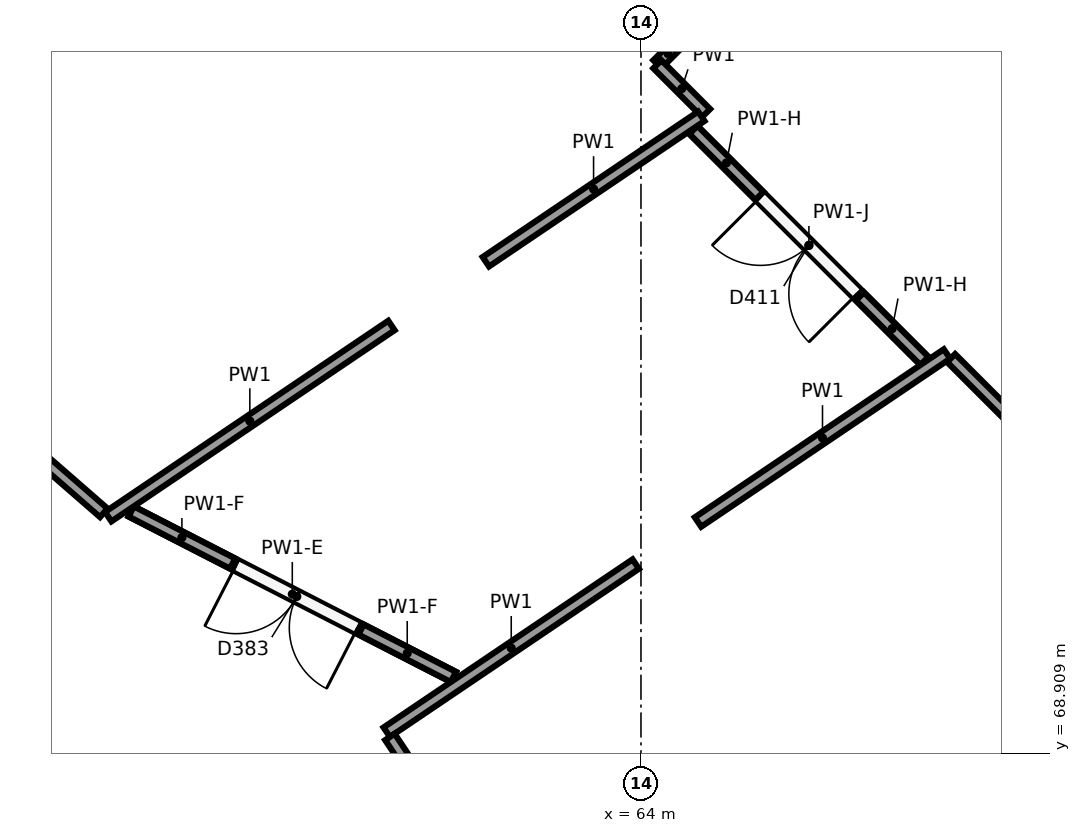
"""IFC4 building model, lengths in metres.
Left out: names, types, materials, properties, quantities, classifications, styles, units other than length and angle.
Written with IfcOpenShell. Run it as: python <this file> out.ifc"""

import sys

from ifc_helpers import new_model, si_unit, direction, frame, frame_2d, origin, origin_2d, place, context, subcontext, project, spatial, rectangle, circle, extrude, element, fill, save


model = new_model("IFC4")
c1 = context("Model", 3, precision=1e-05, world=origin(), true_north=direction((0.0, 1.0)))
c2 = subcontext(c1, "Body", "Model", "MODEL_VIEW")
j1 = project(units=[si_unit("LENGTHUNIT", "METRE"), si_unit("PLANEANGLEUNIT", "RADIAN")], contexts=[c1])
p1 = place(None, origin())
s1 = spatial("IfcSite", under=j1, at=p1, CompositionType="ELEMENT")
p2 = place(p1, origin())
s2 = spatial("IfcBuilding", under=s1, at=p2, CompositionType="ELEMENT")
p3 = place(p2, origin())
s3 = spatial("IfcBuildingStorey", under=s2, at=p3, CompositionType="ELEMENT", Elevation=0.0)
p4 = place(p3, frame((55.94, 68.658, 0.0), z_axis=(0.0, 0.0, 1.0), x_axis=(1.0, 0.0, 0.0)))
e1 = element("IfcColumn", 1, at=p4, inside=s3, PredefinedType="COLUMN", context=c2, shape_type="SweptSolid", body=[
    extrude(circle(Radius=0.4, at=origin_2d()), origin(), (0.0, 0.0, 1.0), 6.5),
])
p5 = place(p3, frame((63.068, 73.47, 0.0), z_axis=(0.0, 0.0, 1.0), x_axis=(1.0, 0.0, 0.0)))
e2 = element("IfcColumn", 2, at=p5, inside=s3, PredefinedType="COLUMN", context=c2, shape_type="SweptSolid", body=[
    extrude(circle(Radius=0.45, at=origin_2d()), origin(), (0.0, 0.0, 1.0), 6.5),
])
p6 = place(p3, frame((60.655, 69.186, 0.0), z_axis=(0.0, 0.0, 1.0), x_axis=(0.828805713465, 0.559536495081, 0.0)))
e3 = element("IfcWall", 3, at=p6, inside=s3, PredefinedType="PARTITIONING", context=c2, shape_type="SweptSolid", body=[
    extrude(rectangle(XDim=3.953, YDim=0.15, at=frame_2d((1.977, 0.0))), origin(), (0.0, 0.0, 1.0), 6.15),
])
p7 = place(p3, frame((64.75, 71.951, 0.0), z_axis=(0.0, 0.0, 1.0), x_axis=(0.828815019126, 0.559522710952, 0.0)))
e4 = element("IfcWall", 4, at=p7, inside=s3, PredefinedType="PARTITIONING", context=c2, shape_type="SweptSolid", body=[
    extrude(rectangle(XDim=3.953, YDim=0.15, at=frame_2d((1.977, 0.0))), origin(), (0.0, 0.0, 1.0), 6.15),
])
p8 = place(p3, frame((68.08, 74.109, 0.0), z_axis=(0.0, 0.0, 1.0), x_axis=(0.70712613939, -0.707087422453, 0.0)))
e5 = element("IfcWall", 5, at=p8, inside=s3, PredefinedType="PARTITIONING", context=c2, shape_type="SweptSolid", body=[
    extrude(rectangle(XDim=6.306, YDim=0.15, at=frame_2d((3.153, 0.0))), origin(), (0.0, 0.0, 1.0), 6.15),
])
p9 = place(p3, frame((63.251, 65.301, 0.0), z_axis=(0.0, 0.0, 1.0), x_axis=(-0.555582071925, 0.831461701677, 0.0)))
e6 = element("IfcWall", 6, at=p9, inside=s3, PredefinedType="PARTITIONING", context=c2, shape_type="SweptSolid", body=[
    extrude(rectangle(XDim=4.598, YDim=0.15, at=frame_2d((2.299, 0.0))), origin(), (0.0, 0.0, 1.0), 6.15),
])
p10 = place(p3, frame((64.496, 78.254, 0.0), z_axis=(0.0, 0.0, 1.0), x_axis=(-0.706798874946, -0.707414553409, 0.0)))
e7 = element("IfcWall", 7, at=p10, inside=s3, PredefinedType="PARTITIONING", context=c2, shape_type="SweptSolid", body=[
    extrude(rectangle(XDim=0.396, YDim=0.15, at=frame_2d((0.198, 0.0))), origin(), (0.0, 0.0, 1.0), 6.15),
])
p11 = place(p3, frame((64.216, 77.973, 0.0), z_axis=(0.0, 0.0, 1.0), x_axis=(0.707106781187, -0.707106781187, 0.0)))
e8 = element("IfcWall", 8, at=p11, inside=s3, PredefinedType="PARTITIONING", context=c2, shape_type="SweptSolid", body=[
    extrude(rectangle(XDim=0.907, YDim=0.15, at=frame_2d((0.454, 0.0))), origin(), (0.0, 0.0, 1.0), 6.15),
])
p12 = place(p3, frame((64.794, 77.289, 0.0), z_axis=(0.0, 0.0, 1.0), x_axis=(-0.828829640135, -0.559501052397, 0.0)))
e9 = element("IfcWall", 9, at=p12, inside=s3, PredefinedType="PARTITIONING", context=c2, shape_type="SweptSolid", body=[
    extrude(rectangle(XDim=3.42, YDim=0.15, at=frame_2d((1.71, 0.0))), origin(), (0.0, 0.0, 1.0), 6.15),
])
p13 = place(p3, frame((60.717, 74.537, 0.0), z_axis=(0.0, 0.0, 1.0), x_axis=(-0.828836712626, -0.559490575259, 0.0)))
e10 = element("IfcWall", 10, at=p13, inside=s3, PredefinedType="PARTITIONING", context=c2, shape_type="SweptSolid", body=[
    extrude(rectangle(XDim=4.496, YDim=0.15, at=frame_2d((2.248, 0.0))), origin(), (0.0, 0.0, 1.0), 6.15),
])
p14 = place(p3, frame((56.932, 72.073, 0.0), z_axis=(0.0, 0.0, 1.0), x_axis=(-0.753910661327, 0.656976951451, 0.0)))
e11 = element("IfcWall", 11, at=p14, inside=s3, PredefinedType="PARTITIONING", context=c2, shape_type="SweptSolid", body=[
    extrude(rectangle(XDim=4.473, YDim=0.15, at=frame_2d((2.237, 0.0))), origin(), (0.0, 0.0, 1.0), 6.15),
])
p15 = place(p3, frame((67.729, 74.071, 0.0), z_axis=(0.0, 0.0, 1.0), x_axis=(-0.707106781187, 0.707106781187, 0.0)))
e12 = element("IfcWall", 12, at=p15, inside=s3, PredefinedType="PARTITIONING", context=c2, shape_type="SweptSolid", body=[
    extrude(rectangle(XDim=4.298, YDim=0.15, at=frame_2d((2.149, 0.0))), origin(), (0.0, 0.0, 1.0), 5.05),
])
p16 = place(p15, frame((1.25, 0.0, 0.0)))
e13 = element("IfcOpeningElement", 13, at=p16, cuts=e12, PredefinedType="OPENING", context=c2, shape_type="SweptSolid", body=[
    extrude(rectangle(XDim=1.8, YDim=2.1, at=frame_2d((0.9, 1.05))), frame((0.0, 0.085, 0.0), z_axis=(0.0, -1.0, 0.0), x_axis=(1.0, 0.0, 0.0)), (0.0, 0.0, 1.0), 0.17),
])
p17 = place(p3, frame((67.729, 74.071, 5.05), z_axis=(0.0, 0.0, 1.0), x_axis=(-0.707106781187, 0.707106781187, 0.0)))
e14 = element("IfcWall", 14, at=p17, inside=s3, PredefinedType="PARTITIONING", context=c2, shape_type="SweptSolid", body=[
    extrude(rectangle(XDim=1.2, YDim=0.15, at=frame_2d((0.6, 0.0))), origin(), (0.0, 0.0, 1.0), 1.1),
])
p18 = place(p3, frame((65.559, 76.241, 5.05), z_axis=(0.0, 0.0, 1.0), x_axis=(-0.707106781187, 0.707106781187, 0.0)))
e15 = element("IfcWall", 15, at=p18, inside=s3, PredefinedType="PARTITIONING", context=c2, shape_type="SweptSolid", body=[
    extrude(rectangle(XDim=1.229, YDim=0.15, at=frame_2d((0.614, 0.0))), origin(), (0.0, 0.0, 1.0), 1.1),
])
p19 = place(p3, frame((61.532, 69.914, 0.0), z_axis=(0.0, 0.0, 1.0), x_axis=(-0.8895805215, 0.456778388027, 0.0)))
e16 = element("IfcWall", 16, at=p19, inside=s3, PredefinedType="PARTITIONING", context=c2, shape_type="SweptSolid", body=[
    extrude(rectangle(XDim=4.765, YDim=0.15, at=frame_2d((2.383, 0.0))), origin(), (0.0, 0.0, 1.0), 5.25),
])
p20 = place(p19, frame((1.415, 0.0, 0.0)))
e17 = element("IfcOpeningElement", 17, at=p20, cuts=e16, PredefinedType="OPENING", context=c2, shape_type="SweptSolid", body=[
    extrude(rectangle(XDim=1.8, YDim=2.1, at=frame_2d((0.9, 1.05))), frame((0.0, 0.085, 0.0), z_axis=(0.0, -1.0, 0.0), x_axis=(1.0, 0.0, 0.0)), (0.0, 0.0, 1.0), 0.17),
])
p21 = place(p3, frame((58.627, 71.405, 5.25), z_axis=(0.0, 0.0, 1.0), x_axis=(-0.88955808117, 0.456822088153, 0.0)))
e18 = element("IfcWall", 18, at=p21, inside=s3, PredefinedType="PARTITIONING", context=c2, shape_type="SweptSolid", body=[
    extrude(rectangle(XDim=1.5, YDim=0.15, at=frame_2d((0.75, 0.0))), origin(), (0.0, 0.0, 1.0), 0.9),
])
p22 = place(p3, frame((61.532, 69.914, 5.25), z_axis=(0.0, 0.0, 1.0), x_axis=(-0.889547379944, 0.45684292578, 0.0)))
e19 = element("IfcWall", 19, at=p22, inside=s3, PredefinedType="PARTITIONING", context=c2, shape_type="SweptSolid", body=[
    extrude(rectangle(XDim=1.365, YDim=0.15, at=frame_2d((0.683, 0.0))), origin(), (0.0, 0.0, 1.0), 0.9),
])
p23 = place(p16, origin())
e20 = element("IfcDoor", 20, at=p23, inside=s3, OperationType="DOUBLE_DOOR_SINGLE_SWING", PredefinedType="DOOR", context=c2, shape_type="SweptSolid", body=[
    extrude(rectangle(XDim=1.8, YDim=2.1, at=frame_2d((0.9, 1.05))), frame((0.0, 0.025, 0.0), z_axis=(0.0, -1.0, 0.0), x_axis=(1.0, 0.0, 0.0)), (0.0, 0.0, 1.0), 0.05),
])
fill(e13, e20)
p24 = place(p20, origin())
e21 = element("IfcDoor", 21, at=p24, inside=s3, OperationType="DOUBLE_DOOR_SINGLE_SWING", PredefinedType="DOOR", context=c2, shape_type="SweptSolid", body=[
    extrude(rectangle(XDim=1.8, YDim=2.1, at=frame_2d((0.9, 1.05))), frame((0.0, 0.025, 0.0), z_axis=(0.0, -1.0, 0.0), x_axis=(1.0, 0.0, 0.0)), (0.0, 0.0, 1.0), 0.05),
])
fill(e17, e21)
save(model, sys.argv[1])
